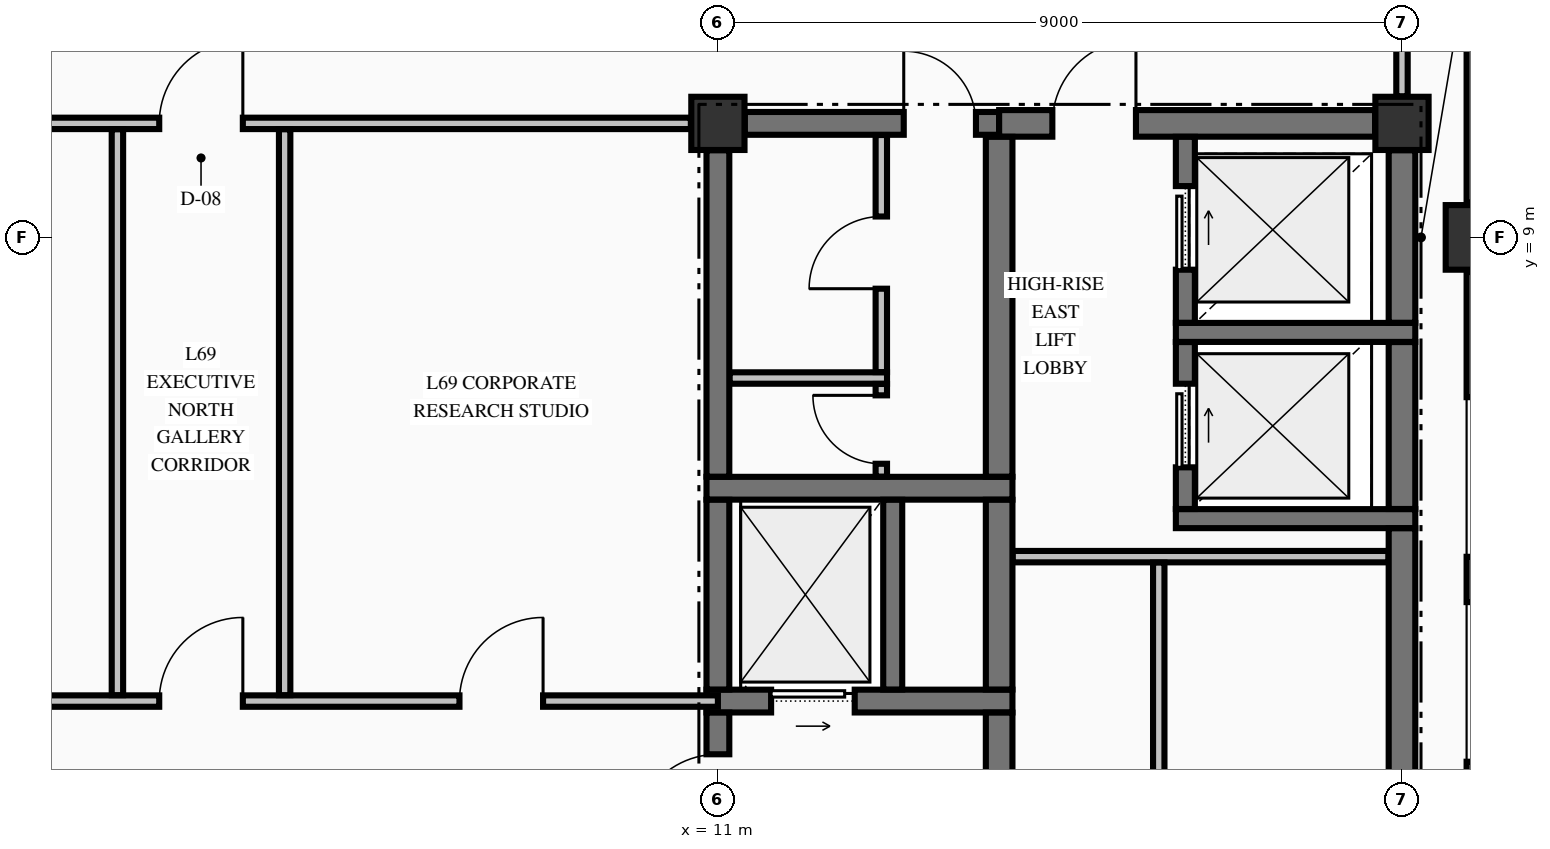
"""IFC4 building model, lengths in metres.
Left out: names, types, materials, properties, quantities, classifications, styles, units other than length and angle.
Written with IfcOpenShell. Run it as: python <this file> out.ifc"""

import sys

from ifc_helpers import new_model, si_unit, direction, frame, frame_2d, origin, origin_2d, place, context, subcontext, project, spatial, rectangle, extrude, element, fill, save


model = new_model("IFC4")
c1 = context("Model", 3, precision=1e-05, world=origin(), true_north=direction((0.0, 1.0)))
c2 = subcontext(c1, "Body", "Model", "MODEL_VIEW")
j1 = project(units=[si_unit("LENGTHUNIT", "METRE"), si_unit("PLANEANGLEUNIT", "RADIAN")], contexts=[c1])
p1 = place(None, origin())
s1 = spatial("IfcSite", under=j1, at=p1, CompositionType="ELEMENT")
p2 = place(p1, origin())
s2 = spatial("IfcBuilding", under=s1, at=p2, CompositionType="ELEMENT")
p3 = place(p2, frame((0.0, 0.0, 260.89)))
s3 = spatial("IfcBuildingStorey", under=s2, at=p3, CompositionType="ELEMENT", Elevation=260.89)
p4 = place(p3, frame((21.0, 9.0, -0.25), z_axis=(0.0, 0.0, 1.0), x_axis=(1.0, 0.0, 0.0)))
e1 = element("IfcColumn", 1, at=p4, inside=s3, PredefinedType="COLUMN", context=c2, shape_type="SweptSolid", body=[
    extrude(rectangle(XDim=0.85, YDim=0.85, at=origin_2d()), origin(), (0.0, 0.0, 1.0), 3.23),
])
for number, where, z_axis, x_axis in (
    (2, (11.0, 10.5, -0.25), (0.0, 0.0, 1.0), (1.0, 0.0, 0.0)),
    (3, (20.0, 10.5, -0.25), (0.0, 0.0, 1.0), (1.0, 0.0, 0.0)),
):
    element("IfcColumn", number, at=place(p3, frame(where, z_axis=z_axis, x_axis=x_axis)), inside=s3, PredefinedType="COLUMN", context=c2, shape_type="SweptSolid", body=[
        extrude(rectangle(XDim=0.7, YDim=0.7, at=origin_2d()), origin(), (0.0, 0.0, 1.0), 3.23),
    ])
p5 = place(p3, frame((21.0, 0.455, 0.0), z_axis=(0.0, 0.0, 1.0), x_axis=(0.0, 1.0, 0.0)))
e4 = element("IfcWall", 4, at=p5, inside=s3, PredefinedType="STANDARD", context=c2, shape_type="SweptSolid", body=[
    extrude(rectangle(XDim=8.09, YDim=0.3, at=frame_2d((4.045, 0.0))), origin(), (0.0, 0.0, 1.0), 2.372),
])
p6 = place(p5, frame((1.647, 0.0, 0.7)))
e5 = element("IfcOpeningElement", 5, at=p6, cuts=e4, PredefinedType="OPENING", context=c2, shape_type="SweptSolid", body=[
    extrude(rectangle(XDim=2.1, YDim=1.5, at=frame_2d((1.05, 0.75))), frame((0.0, 0.16, 0.0), z_axis=(0.0, -1.0, 0.0), x_axis=(1.0, 0.0, 0.0)), (0.0, 0.0, 1.0), 0.32),
])
p7 = place(p5, frame((4.343, 0.0, 0.7)))
e6 = element("IfcOpeningElement", 6, at=p7, cuts=e4, PredefinedType="OPENING", context=c2, shape_type="SweptSolid", body=[
    extrude(rectangle(XDim=2.1, YDim=1.5, at=frame_2d((1.05, 0.75))), frame((0.0, 0.16, 0.0), z_axis=(0.0, -1.0, 0.0), x_axis=(1.0, 0.0, 0.0)), (0.0, 0.0, 1.0), 0.32),
])
p8 = place(p3, frame((21.0, 9.455, 0.0), z_axis=(0.0, 0.0, 1.0), x_axis=(0.0, 1.0, 0.0)))
e7 = element("IfcWall", 7, at=p8, inside=s3, PredefinedType="STANDARD", context=c2, shape_type="SweptSolid", body=[
    extrude(rectangle(XDim=8.09, YDim=0.3, at=frame_2d((4.045, 0.0))), origin(), (0.0, 0.0, 1.0), 2.372),
])
p9 = place(p3, frame((10.85, 2.9, 0.0), z_axis=(0.0, 0.0, 1.0), x_axis=(1.0, 0.0, 0.0)))
e8 = element("IfcWall", 8, at=p9, inside=s3, PredefinedType="SHEAR", context=c2, shape_type="SweptSolid", body=[
    extrude(rectangle(XDim=4.025, YDim=0.3, at=frame_2d((2.012, 0.0))), origin(), (0.0, 0.0, 1.0), 2.98),
])
p10 = place(p9, frame((0.85, 0.0, 0.0)))
e9 = element("IfcOpeningElement", 9, at=p10, cuts=e8, PredefinedType="OPENING", context=c2, shape_type="SweptSolid", body=[
    extrude(rectangle(XDim=1.1, YDim=2.2, at=frame_2d((0.55, 1.1))), frame((0.0, 0.16, 0.0), z_axis=(0.0, -1.0, 0.0), x_axis=(1.0, 0.0, 0.0)), (0.0, 0.0, 1.0), 0.32),
])
p11 = place(p3, frame((17.025, 5.3, 0.0), z_axis=(0.0, 0.0, 1.0), x_axis=(1.0, 0.0, 0.0)))
e10 = element("IfcWall", 10, at=p11, inside=s3, PredefinedType="SOLIDWALL", context=c2, shape_type="SweptSolid", body=[
    extrude(rectangle(XDim=3.15, YDim=0.25, at=frame_2d((1.575, 0.0))), origin(), (0.0, 0.0, 1.0), 2.98),
])
p12 = place(p3, frame((10.85, 5.7, 0.0), z_axis=(0.0, 0.0, 1.0), x_axis=(1.0, 0.0, 0.0)))
e11 = element("IfcWall", 11, at=p12, inside=s3, PredefinedType="SHEAR", context=c2, shape_type="SweptSolid", body=[
    extrude(rectangle(XDim=4.025, YDim=0.3, at=frame_2d((2.012, 0.0))), origin(), (0.0, 0.0, 1.0), 2.98),
])
p13 = place(p3, frame((17.025, 7.75, 0.0), z_axis=(0.0, 0.0, 1.0), x_axis=(1.0, 0.0, 0.0)))
e12 = element("IfcWall", 12, at=p13, inside=s3, PredefinedType="SOLIDWALL", context=c2, shape_type="SweptSolid", body=[
    extrude(rectangle(XDim=3.15, YDim=0.25, at=frame_2d((1.575, 0.0))), origin(), (0.0, 0.0, 1.0), 2.98),
])
p14 = place(p3, frame((11.354, 10.5, 0.0), z_axis=(0.0, 0.0, 1.0), x_axis=(1.0, 0.0, 0.0)))
e13 = element("IfcWall", 13, at=p14, inside=s3, PredefinedType="SHEAR", context=c2, shape_type="SweptSolid", body=[
    extrude(rectangle(XDim=3.346, YDim=0.3, at=frame_2d((1.673, 0.0))), origin(), (0.0, 0.0, 1.0), 2.98),
])
p15 = place(p14, frame((2.091, 0.0, 0.0)))
e14 = element("IfcOpeningElement", 14, at=p15, cuts=e13, PredefinedType="OPENING", context=c2, shape_type="SweptSolid", body=[
    extrude(rectangle(XDim=0.95, YDim=2.15, at=frame_2d((0.475, 1.075))), frame((0.0, 0.16, 0.0), z_axis=(0.0, -1.0, 0.0), x_axis=(1.0, 0.0, 0.0)), (0.0, 0.0, 1.0), 0.32),
])
p16 = place(p3, frame((14.7, 10.5, 0.0), z_axis=(0.0, 0.0, 1.0), x_axis=(1.0, 0.0, 0.0)))
e15 = element("IfcWall", 15, at=p16, inside=s3, PredefinedType="SHEAR", context=c2, shape_type="SweptSolid", body=[
    extrude(rectangle(XDim=4.946, YDim=0.35, at=frame_2d((2.473, 0.0))), origin(), (0.0, 0.0, 1.0), 2.98),
])
p17 = place(p16, frame((0.7, 0.0, 0.0)))
e16 = element("IfcOpeningElement", 16, at=p17, cuts=e15, PredefinedType="OPENING", context=c2, shape_type="SweptSolid", body=[
    extrude(rectangle(XDim=1.1, YDim=2.15, at=frame_2d((0.55, 1.075))), frame((0.0, 0.185, 0.0), z_axis=(0.0, -1.0, 0.0), x_axis=(1.0, 0.0, 0.0)), (0.0, 0.0, 1.0), 0.37),
])
p18 = place(p3, frame((-11.0, 2.9, 0.0), z_axis=(0.0, 0.0, 1.0), x_axis=(1.0, 0.0, 0.0)))
e17 = element("IfcWall", 17, at=p18, inside=s3, PredefinedType="PARTITIONING", context=c2, shape_type="SweptSolid", body=[
    extrude(rectangle(XDim=22.0, YDim=0.15, at=frame_2d((11.0, 0.0))), origin(), (0.0, 0.0, 1.0), 2.98),
])
p19 = place(p18, frame((14.65, 0.0, 0.0)))
e18 = element("IfcOpeningElement", 18, at=p19, cuts=e17, PredefinedType="OPENING", context=c2, shape_type="SweptSolid", body=[
    extrude(rectangle(XDim=1.1, YDim=2.15, at=frame_2d((0.55, 1.075))), frame((0.0, 0.085, 0.0), z_axis=(0.0, -1.0, 0.0), x_axis=(1.0, 0.0, 0.0)), (0.0, 0.0, 1.0), 0.17),
])
p20 = place(p18, frame((6.525, 0.0, 0.0)))
e19 = element("IfcOpeningElement", 19, at=p20, cuts=e17, PredefinedType="OPENING", context=c2, shape_type="SweptSolid", body=[
    extrude(rectangle(XDim=1.05, YDim=2.15, at=frame_2d((0.525, 1.075))), frame((0.0, 0.085, 0.0), z_axis=(0.0, -1.0, 0.0), x_axis=(1.0, 0.0, 0.0)), (0.0, 0.0, 1.0), 0.17),
])
p21 = place(p18, frame((18.6, 0.0, 0.0)))
e20 = element("IfcOpeningElement", 20, at=p21, cuts=e17, PredefinedType="OPENING", context=c2, shape_type="SweptSolid", body=[
    extrude(rectangle(XDim=1.1, YDim=2.15, at=frame_2d((0.55, 1.075))), frame((0.0, 0.085, 0.0), z_axis=(0.0, -1.0, 0.0), x_axis=(1.0, 0.0, 0.0)), (0.0, 0.0, 1.0), 0.17),
])
p22 = place(p3, frame((14.878, 4.8, 0.0), z_axis=(0.0, 0.0, 1.0), x_axis=(1.0, 0.0, 0.0)))
e21 = element("IfcWall", 21, at=p22, inside=s3, PredefinedType="PARTITIONING", context=c2, shape_type="SweptSolid", body=[
    extrude(rectangle(XDim=4.944, YDim=0.15, at=frame_2d((2.472, 0.0))), origin(), (0.0, 0.0, 1.0), 2.98),
])
p23 = place(p3, frame((11.153, 7.15, 0.0), z_axis=(0.0, 0.0, 1.0), x_axis=(1.0, 0.0, 0.0)))
e22 = element("IfcWall", 22, at=p23, inside=s3, PredefinedType="PARTITIONING", context=c2, shape_type="SweptSolid", body=[
    extrude(rectangle(XDim=2.072, YDim=0.15, at=frame_2d((1.036, 0.0))), origin(), (0.0, 0.0, 1.0), 2.98),
])
p24 = place(p3, frame((-10.644, 10.5, 0.0), z_axis=(0.0, 0.0, 1.0), x_axis=(1.0, 0.0, 0.0)))
e23 = element("IfcWall", 23, at=p24, inside=s3, PredefinedType="PARTITIONING", context=c2, shape_type="SweptSolid", body=[
    extrude(rectangle(XDim=21.288, YDim=0.15, at=frame_2d((10.644, 0.0))), origin(), (0.0, 0.0, 1.0), 2.98),
])
p25 = place(p24, frame((14.294, 0.0, 0.0)))
e24 = element("IfcOpeningElement", 24, at=p25, cuts=e23, PredefinedType="OPENING", context=c2, shape_type="SweptSolid", body=[
    extrude(rectangle(XDim=1.1, YDim=2.15, at=frame_2d((0.55, 1.075))), frame((0.0, 0.085, 0.0), z_axis=(0.0, -1.0, 0.0), x_axis=(1.0, 0.0, 0.0)), (0.0, 0.0, 1.0), 0.17),
])
p26 = place(p3, frame((11.0, 0.354, 0.0), z_axis=(0.0, 0.0, 1.0), x_axis=(0.0, 1.0, 0.0)))
e25 = element("IfcWall", 25, at=p26, inside=s3, PredefinedType="SHEAR", context=c2, shape_type="SweptSolid", body=[
    extrude(rectangle(XDim=2.394, YDim=0.3, at=frame_2d((1.197, 0.0))), origin(), (0.0, 0.0, 1.0), 2.98),
])
p27 = place(p26, frame((0.746, 0.0, 0.0)))
e26 = element("IfcOpeningElement", 26, at=p27, cuts=e25, PredefinedType="OPENING", context=c2, shape_type="SweptSolid", body=[
    extrude(rectangle(XDim=1.1, YDim=2.15, at=frame_2d((0.55, 1.075))), frame((0.0, 0.16, 0.0), z_axis=(0.0, -1.0, 0.0), x_axis=(1.0, 0.0, 0.0)), (0.0, 0.0, 1.0), 0.32),
])
p28 = place(p3, frame((11.0, 3.052, 0.0), z_axis=(0.0, 0.0, 1.0), x_axis=(0.0, 1.0, 0.0)))
e27 = element("IfcWall", 27, at=p28, inside=s3, PredefinedType="SHEAR", context=c2, shape_type="SweptSolid", body=[
    extrude(rectangle(XDim=2.496, YDim=0.3, at=frame_2d((1.248, 0.0))), origin(), (0.0, 0.0, 1.0), 2.98),
])
p29 = place(p3, frame((11.0, 5.852, 0.0), z_axis=(0.0, 0.0, 1.0), x_axis=(0.0, 1.0, 0.0)))
e28 = element("IfcWall", 28, at=p29, inside=s3, PredefinedType="SHEAR", context=c2, shape_type="SweptSolid", body=[
    extrude(rectangle(XDim=4.294, YDim=0.3, at=frame_2d((2.147, 0.0))), origin(), (0.0, 0.0, 1.0), 2.98),
])
p30 = place(p3, frame((13.3, 3.052, 0.0), z_axis=(0.0, 0.0, 1.0), x_axis=(0.0, 1.0, 0.0)))
e29 = element("IfcWall", 29, at=p30, inside=s3, PredefinedType="SOLIDWALL", context=c2, shape_type="SweptSolid", body=[
    extrude(rectangle(XDim=2.496, YDim=0.25, at=frame_2d((1.248, 0.0))), origin(), (0.0, 0.0, 1.0), 2.98),
])
p31 = place(p3, frame((14.7, -0.098, 0.0), z_axis=(0.0, 0.0, 1.0), x_axis=(0.0, 1.0, 0.0)))
e30 = element("IfcWall", 30, at=p31, inside=s3, PredefinedType="SHEAR", context=c2, shape_type="SweptSolid", body=[
    extrude(rectangle(XDim=2.846, YDim=0.35, at=frame_2d((1.423, 0.0))), origin(), (0.0, 0.0, 1.0), 2.98),
])
p32 = place(p3, frame((14.7, 3.052, 0.0), z_axis=(0.0, 0.0, 1.0), x_axis=(0.0, 1.0, 0.0)))
e31 = element("IfcWall", 31, at=p32, inside=s3, PredefinedType="SHEAR", context=c2, shape_type="SweptSolid", body=[
    extrude(rectangle(XDim=2.496, YDim=0.35, at=frame_2d((1.248, 0.0))), origin(), (0.0, 0.0, 1.0), 2.98),
])
p33 = place(p3, frame((14.7, 5.852, 0.0), z_axis=(0.0, 0.0, 1.0), x_axis=(0.0, 1.0, 0.0)))
e32 = element("IfcWall", 32, at=p33, inside=s3, PredefinedType="SHEAR", context=c2, shape_type="SweptSolid", body=[
    extrude(rectangle(XDim=4.471, YDim=0.35, at=frame_2d((2.235, 0.0))), origin(), (0.0, 0.0, 1.0), 2.98),
])
p34 = place(p3, frame((17.15, 5.427, 0.0), z_axis=(0.0, 0.0, 1.0), x_axis=(0.0, 1.0, 0.0)))
e33 = element("IfcWall", 33, at=p34, inside=s3, PredefinedType="SOLIDWALL", context=c2, shape_type="SweptSolid", body=[
    extrude(rectangle(XDim=2.196, YDim=0.25, at=frame_2d((1.098, 0.0))), origin(), (0.0, 0.0, 1.0), 2.98),
])
p35 = place(p34, frame((0.548, 0.0, 0.0)))
e34 = element("IfcOpeningElement", 34, at=p35, cuts=e33, PredefinedType="OPENING", context=c2, shape_type="SweptSolid", body=[
    extrude(rectangle(XDim=1.1, YDim=2.2, at=frame_2d((0.55, 1.1))), frame((0.0, 0.135, 0.0), z_axis=(0.0, -1.0, 0.0), x_axis=(1.0, 0.0, 0.0)), (0.0, 0.0, 1.0), 0.27),
])
p36 = place(p3, frame((17.15, 7.877, 0.0), z_axis=(0.0, 0.0, 1.0), x_axis=(0.0, 1.0, 0.0)))
e35 = element("IfcWall", 35, at=p36, inside=s3, PredefinedType="SOLIDWALL", context=c2, shape_type="SweptSolid", body=[
    extrude(rectangle(XDim=2.446, YDim=0.25, at=frame_2d((1.223, 0.0))), origin(), (0.0, 0.0, 1.0), 2.98),
])
p37 = place(p36, frame((0.698, 0.0, 0.0)))
e36 = element("IfcOpeningElement", 36, at=p37, cuts=e35, PredefinedType="OPENING", context=c2, shape_type="SweptSolid", body=[
    extrude(rectangle(XDim=1.1, YDim=2.2, at=frame_2d((0.55, 1.1))), frame((0.0, 0.135, 0.0), z_axis=(0.0, -1.0, 0.0), x_axis=(1.0, 0.0, 0.0)), (0.0, 0.0, 1.0), 0.27),
])
p38 = place(p3, frame((20.0, -9.596, 0.0), z_axis=(0.0, 0.0, 1.0), x_axis=(0.0, 1.0, 0.0)))
e37 = element("IfcWall", 37, at=p38, inside=s3, PredefinedType="SHEAR", context=c2, shape_type="SweptSolid", body=[
    extrude(rectangle(XDim=14.769, YDim=0.35, at=frame_2d((7.385, 0.0))), origin(), (0.0, 0.0, 1.0), 2.98),
])
p39 = place(p3, frame((20.0, 5.427, 0.0), z_axis=(0.0, 0.0, 1.0), x_axis=(0.0, 1.0, 0.0)))
e38 = element("IfcWall", 38, at=p39, inside=s3, PredefinedType="SHEAR", context=c2, shape_type="SweptSolid", body=[
    extrude(rectangle(XDim=2.196, YDim=0.35, at=frame_2d((1.098, 0.0))), origin(), (0.0, 0.0, 1.0), 2.98),
])
p40 = place(p3, frame((20.0, 7.877, 0.0), z_axis=(0.0, 0.0, 1.0), x_axis=(0.0, 1.0, 0.0)))
e39 = element("IfcWall", 39, at=p40, inside=s3, PredefinedType="SHEAR", context=c2, shape_type="SweptSolid", body=[
    extrude(rectangle(XDim=2.269, YDim=0.35, at=frame_2d((1.135, 0.0))), origin(), (0.0, 0.0, 1.0), 2.98),
])
for number, where, z_axis, x_axis in (
    (40, (3.1, 2.978, 0.0), (0.0, 0.0, 1.0), (0.0, 1.0, 0.0)),
    (41, (5.3, 2.978, 0.0), (0.0, 0.0, 1.0), (0.0, 1.0, 0.0)),
):
    element("IfcWall", number, at=place(p3, frame(where, z_axis=z_axis, x_axis=x_axis)), inside=s3, PredefinedType="PARTITIONING", context=c2, shape_type="SweptSolid", body=[
        extrude(rectangle(XDim=7.444, YDim=0.15, at=frame_2d((3.722, 0.0))), origin(), (0.0, 0.0, 1.0), 2.98),
    ])
p41 = place(p3, frame((13.15, 5.853, 0.0), z_axis=(0.0, 0.0, 1.0), x_axis=(0.0, 1.0, 0.0)))
e42 = element("IfcWall", 42, at=p41, inside=s3, PredefinedType="PARTITIONING", context=c2, shape_type="SweptSolid", body=[
    extrude(rectangle(XDim=1.219, YDim=0.15, at=frame_2d((0.609, 0.0))), origin(), (0.0, 0.0, 1.0), 2.98),
])
p42 = place(p41, frame((0.169, 0.0, 0.0)))
e43 = element("IfcOpeningElement", 43, at=p42, cuts=e42, PredefinedType="OPENING", context=c2, shape_type="SweptSolid", body=[
    extrude(rectangle(XDim=0.9, YDim=2.15, at=frame_2d((0.45, 1.075))), frame((0.0, 0.085, 0.0), z_axis=(0.0, -1.0, 0.0), x_axis=(1.0, 0.0, 0.0)), (0.0, 0.0, 1.0), 0.17),
])
p43 = place(p3, frame((13.15, 7.228, 0.0), z_axis=(0.0, 0.0, 1.0), x_axis=(0.0, 1.0, 0.0)))
e44 = element("IfcWall", 44, at=p43, inside=s3, PredefinedType="PARTITIONING", context=c2, shape_type="SweptSolid", body=[
    extrude(rectangle(XDim=3.119, YDim=0.15, at=frame_2d((1.56, 0.0))), origin(), (0.0, 0.0, 1.0), 2.98),
])
p44 = place(p43, frame((1.097, 0.0, 0.0)))
e45 = element("IfcOpeningElement", 45, at=p44, cuts=e44, PredefinedType="OPENING", context=c2, shape_type="SweptSolid", body=[
    extrude(rectangle(XDim=0.95, YDim=2.15, at=frame_2d((0.475, 1.075))), frame((0.0, 0.085, 0.0), z_axis=(0.0, -1.0, 0.0), x_axis=(1.0, 0.0, 0.0)), (0.0, 0.0, 1.0), 0.17),
])
p45 = place(p3, frame((16.8, -2.422, 0.0), z_axis=(0.0, 0.0, 1.0), x_axis=(0.0, 1.0, 0.0)))
e46 = element("IfcWall", 46, at=p45, inside=s3, PredefinedType="PARTITIONING", context=c2, shape_type="SweptSolid", body=[
    extrude(rectangle(XDim=7.144, YDim=0.15, at=frame_2d((3.572, 0.0))), origin(), (0.0, 0.0, 1.0), 2.98),
])
p46 = place(p3, frame((20.0, 10.856, 0.0), z_axis=(0.0, 0.0, 1.0), x_axis=(0.0, 1.0, 0.0)))
e47 = element("IfcWall", 47, at=p46, inside=s3, PredefinedType="PARTITIONING", context=c2, shape_type="SweptSolid", body=[
    extrude(rectangle(XDim=2.016, YDim=0.15, at=frame_2d((1.008, 0.0))), origin(), (0.0, 0.0, 1.0), 2.57),
])
p47 = place(p27, origin())
e48 = element("IfcDoor", 48, at=p47, inside=s3, OperationType="SINGLE_SWING_LEFT", PredefinedType="DOOR", context=c2, shape_type="SweptSolid", body=[
    extrude(rectangle(XDim=1.1, YDim=2.15, at=frame_2d((0.55, 1.075))), frame((0.0, 0.025, 0.0), z_axis=(0.0, -1.0, 0.0), x_axis=(1.0, 0.0, 0.0)), (0.0, 0.0, 1.0), 0.05),
])
fill(e26, e48)
p48 = place(p10, origin())
e49 = element("IfcDoor", 49, at=p48, inside=s3, OperationType="SLIDING_TO_RIGHT", PredefinedType="DOOR", context=c2, shape_type="SweptSolid", body=[
    extrude(rectangle(XDim=1.1, YDim=2.2, at=frame_2d((0.55, 1.1))), frame((0.0, 0.025, 0.0), z_axis=(0.0, -1.0, 0.0), x_axis=(1.0, 0.0, 0.0)), (0.0, 0.0, 1.0), 0.05),
])
fill(e9, e49)
p49 = place(p15, origin())
e50 = element("IfcDoor", 50, at=p49, inside=s3, OperationType="SINGLE_SWING_LEFT", PredefinedType="DOOR", context=c2, shape_type="SweptSolid", body=[
    extrude(rectangle(XDim=0.95, YDim=2.15, at=frame_2d((0.475, 1.075))), frame((0.0, 0.025, 0.0), z_axis=(0.0, -1.0, 0.0), x_axis=(1.0, 0.0, 0.0)), (0.0, 0.0, 1.0), 0.05),
])
fill(e14, e50)
p50 = place(p42, origin())
e51 = element("IfcDoor", 51, at=p50, inside=s3, OperationType="SINGLE_SWING_RIGHT", PredefinedType="DOOR", context=c2, shape_type="SweptSolid", body=[
    extrude(rectangle(XDim=0.9, YDim=2.15, at=frame_2d((0.45, 1.075))), frame((0.0, 0.025, 0.0), z_axis=(0.0, -1.0, 0.0), x_axis=(1.0, 0.0, 0.0)), (0.0, 0.0, 1.0), 0.05),
])
fill(e43, e51)
p51 = place(p44, origin())
e52 = element("IfcDoor", 52, at=p51, inside=s3, OperationType="SINGLE_SWING_LEFT", PredefinedType="DOOR", context=c2, shape_type="SweptSolid", body=[
    extrude(rectangle(XDim=0.95, YDim=2.15, at=frame_2d((0.475, 1.075))), frame((0.0, 0.025, 0.0), z_axis=(0.0, -1.0, 0.0), x_axis=(1.0, 0.0, 0.0)), (0.0, 0.0, 1.0), 0.05),
])
fill(e45, e52)
p52 = place(p35, origin())
e53 = element("IfcDoor", 53, at=p52, inside=s3, OperationType="SLIDING_TO_RIGHT", PredefinedType="DOOR", context=c2, shape_type="SweptSolid", body=[
    extrude(rectangle(XDim=1.1, YDim=2.2, at=frame_2d((0.55, 1.1))), frame((0.0, 0.025, 0.0), z_axis=(0.0, -1.0, 0.0), x_axis=(1.0, 0.0, 0.0)), (0.0, 0.0, 1.0), 0.05),
])
fill(e34, e53)
p53 = place(p37, origin())
e54 = element("IfcDoor", 54, at=p53, inside=s3, OperationType="SLIDING_TO_RIGHT", PredefinedType="DOOR", context=c2, shape_type="SweptSolid", body=[
    extrude(rectangle(XDim=1.1, YDim=2.2, at=frame_2d((0.55, 1.1))), frame((0.0, 0.025, 0.0), z_axis=(0.0, -1.0, 0.0), x_axis=(1.0, 0.0, 0.0)), (0.0, 0.0, 1.0), 0.05),
])
fill(e36, e54)
p54 = place(p17, origin())
e55 = element("IfcDoor", 55, at=p54, inside=s3, OperationType="SINGLE_SWING_RIGHT", PredefinedType="DOOR", context=c2, shape_type="SweptSolid", body=[
    extrude(rectangle(XDim=1.1, YDim=2.15, at=frame_2d((0.55, 1.075))), frame((0.0, 0.025, 0.0), z_axis=(0.0, -1.0, 0.0), x_axis=(1.0, 0.0, 0.0)), (0.0, 0.0, 1.0), 0.05),
])
fill(e16, e55)
p55 = place(p25, origin())
e56 = element("IfcDoor", 56, at=p55, inside=s3, OperationType="SINGLE_SWING_RIGHT", PredefinedType="DOOR", context=c2, shape_type="SweptSolid", body=[
    extrude(rectangle(XDim=1.1, YDim=2.15, at=frame_2d((0.55, 1.075))), frame((0.0, 0.025, 0.0), z_axis=(0.0, -1.0, 0.0), x_axis=(1.0, 0.0, 0.0)), (0.0, 0.0, 1.0), 0.05),
])
fill(e24, e56)
p56 = place(p19, origin())
e57 = element("IfcDoor", 57, at=p56, inside=s3, OperationType="SINGLE_SWING_RIGHT", PredefinedType="DOOR", context=c2, shape_type="SweptSolid", body=[
    extrude(rectangle(XDim=1.1, YDim=2.15, at=frame_2d((0.55, 1.075))), frame((0.0, 0.025, 0.0), z_axis=(0.0, -1.0, 0.0), x_axis=(1.0, 0.0, 0.0)), (0.0, 0.0, 1.0), 0.05),
])
fill(e18, e57)
p57 = place(p21, origin())
e58 = element("IfcDoor", 58, at=p57, inside=s3, OperationType="SINGLE_SWING_RIGHT", PredefinedType="DOOR", context=c2, shape_type="SweptSolid", body=[
    extrude(rectangle(XDim=1.1, YDim=2.15, at=frame_2d((0.55, 1.075))), frame((0.0, 0.025, 0.0), z_axis=(0.0, -1.0, 0.0), x_axis=(1.0, 0.0, 0.0)), (0.0, 0.0, 1.0), 0.05),
])
fill(e20, e58)
save(model, sys.argv[1])
